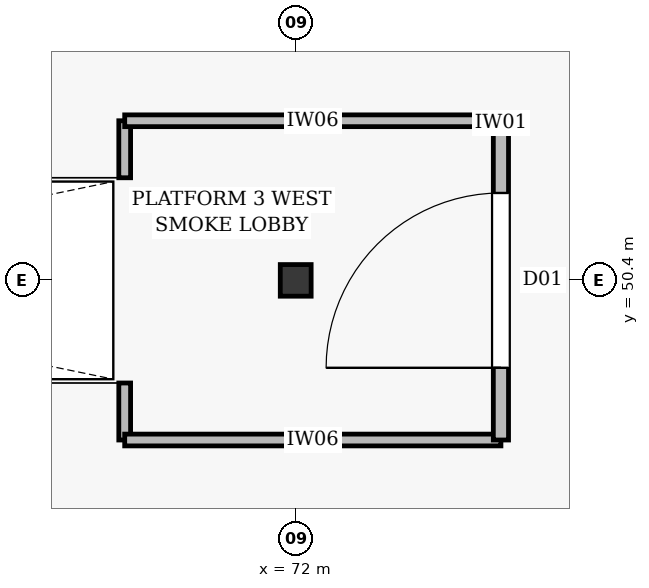
"""IFC4 building model, lengths in metres.
Left out: names, types, materials, properties, quantities, classifications, styles, units other than length and angle.
Written with IfcOpenShell. Run it as: python <this file> out.ifc"""

import sys

from ifc_helpers import new_model, si_unit, direction, frame, frame_2d, origin, origin_2d, place, context, subcontext, project, spatial, rectangle, i_section, extrude, element, fill, save


model = new_model("IFC4")
c1 = context("Model", 3, precision=1e-05, world=origin(), true_north=direction((0.0, 1.0)))
c2 = subcontext(c1, "Body", "Model", "MODEL_VIEW")
j1 = project(units=[si_unit("LENGTHUNIT", "METRE"), si_unit("PLANEANGLEUNIT", "RADIAN")], contexts=[c1])
p1 = place(None, origin())
s1 = spatial("IfcSite", under=j1, at=p1, CompositionType="ELEMENT")
p2 = place(p1, origin())
s2 = spatial("IfcBuilding", under=s1, at=p2, CompositionType="ELEMENT")
p3 = place(p2, frame((0.0, 0.0, 6.6)))
s3 = spatial("IfcBuildingStorey", under=s2, at=p3, CompositionType="ELEMENT", Elevation=6.6)
p4 = place(p3, frame((72.0, 50.4, 0.0), z_axis=(0.0, 0.0, 1.0), x_axis=(1.0, 0.0, 0.0)))
e1 = element("IfcColumn", 1, at=p4, inside=s3, PredefinedType="COLUMN", context=c2, shape_type="SweptSolid", body=[
    extrude(i_section(OverallWidth=0.406, OverallDepth=0.416, WebThickness=0.023, FlangeThickness=0.035, at=origin_2d()), origin(), (0.0, 0.0, 1.0), 6.0),
])
for number, where, z_axis, x_axis in (
    (2, (69.75, 48.3, 0.0), (0.0, 0.0, 1.0), (0.0, 1.0, 0.0)),
    (3, (69.75, 51.75, 0.0), (0.0, 0.0, 1.0), (0.0, 1.0, 0.0)),
):
    element("IfcWall", number, at=place(p3, frame(where, z_axis=z_axis, x_axis=x_axis)), inside=s3, PredefinedType="PARTITIONING", context=c2, shape_type="SweptSolid", body=[
        extrude(rectangle(XDim=0.75, YDim=0.155, at=frame_2d((0.375, 0.0))), origin(), (0.0, 0.0, 1.0), 2.62),
    ])
for number, where, z_axis, x_axis in (
    (4, (69.75, 48.3, 0.0), (0.0, 0.0, 1.0), (1.0, 0.0, 0.0)),
    (5, (69.75, 52.5, 0.0), (0.0, 0.0, 1.0), (1.0, 0.0, 0.0)),
):
    element("IfcWall", number, at=place(p3, frame(where, z_axis=z_axis, x_axis=x_axis)), inside=s3, PredefinedType="PARTITIONING", context=c2, shape_type="SweptSolid", body=[
        extrude(rectangle(XDim=4.95, YDim=0.155, at=frame_2d((2.475, 0.0))), origin(), (0.0, 0.0, 1.0), 2.62),
    ])
p5 = place(p3, frame((74.7, 48.3, 0.0), z_axis=(0.0, 0.0, 1.0), x_axis=(0.0, 1.0, 0.0)))
e6 = element("IfcWall", 6, at=p5, inside=s3, PredefinedType="PARTITIONING", context=c2, shape_type="SweptSolid", body=[
    extrude(rectangle(XDim=4.2, YDim=0.2, at=frame_2d((2.1, 0.0))), origin(), (0.0, 0.0, 1.0), 2.62),
])
p6 = place(p5, frame((0.95, 0.0, 0.005)))
e7 = element("IfcOpeningElement", 7, at=p6, cuts=e6, PredefinedType="OPENING", context=c2, shape_type="SweptSolid", body=[
    extrude(rectangle(XDim=2.3, YDim=2.4, at=frame_2d((1.15, 1.2))), frame((0.0, 0.112, 0.0), z_axis=(0.0, -1.0, 0.0), x_axis=(1.0, 0.0, 0.0)), (0.0, 0.0, 1.0), 0.224),
])
p7 = place(p6, origin())
e8 = element("IfcDoor", 8, at=p7, inside=s3, OperationType="DOUBLE_DOOR_SINGLE_SWING", PredefinedType="DOOR", context=c2, shape_type="SweptSolid", body=[
    extrude(rectangle(XDim=2.3, YDim=2.4, at=frame_2d((1.15, 1.2))), frame((0.0, 0.025, 0.0), z_axis=(0.0, -1.0, 0.0), x_axis=(1.0, 0.0, 0.0)), (0.0, 0.0, 1.0), 0.05),
])
fill(e7, e8)
save(model, sys.argv[1])
